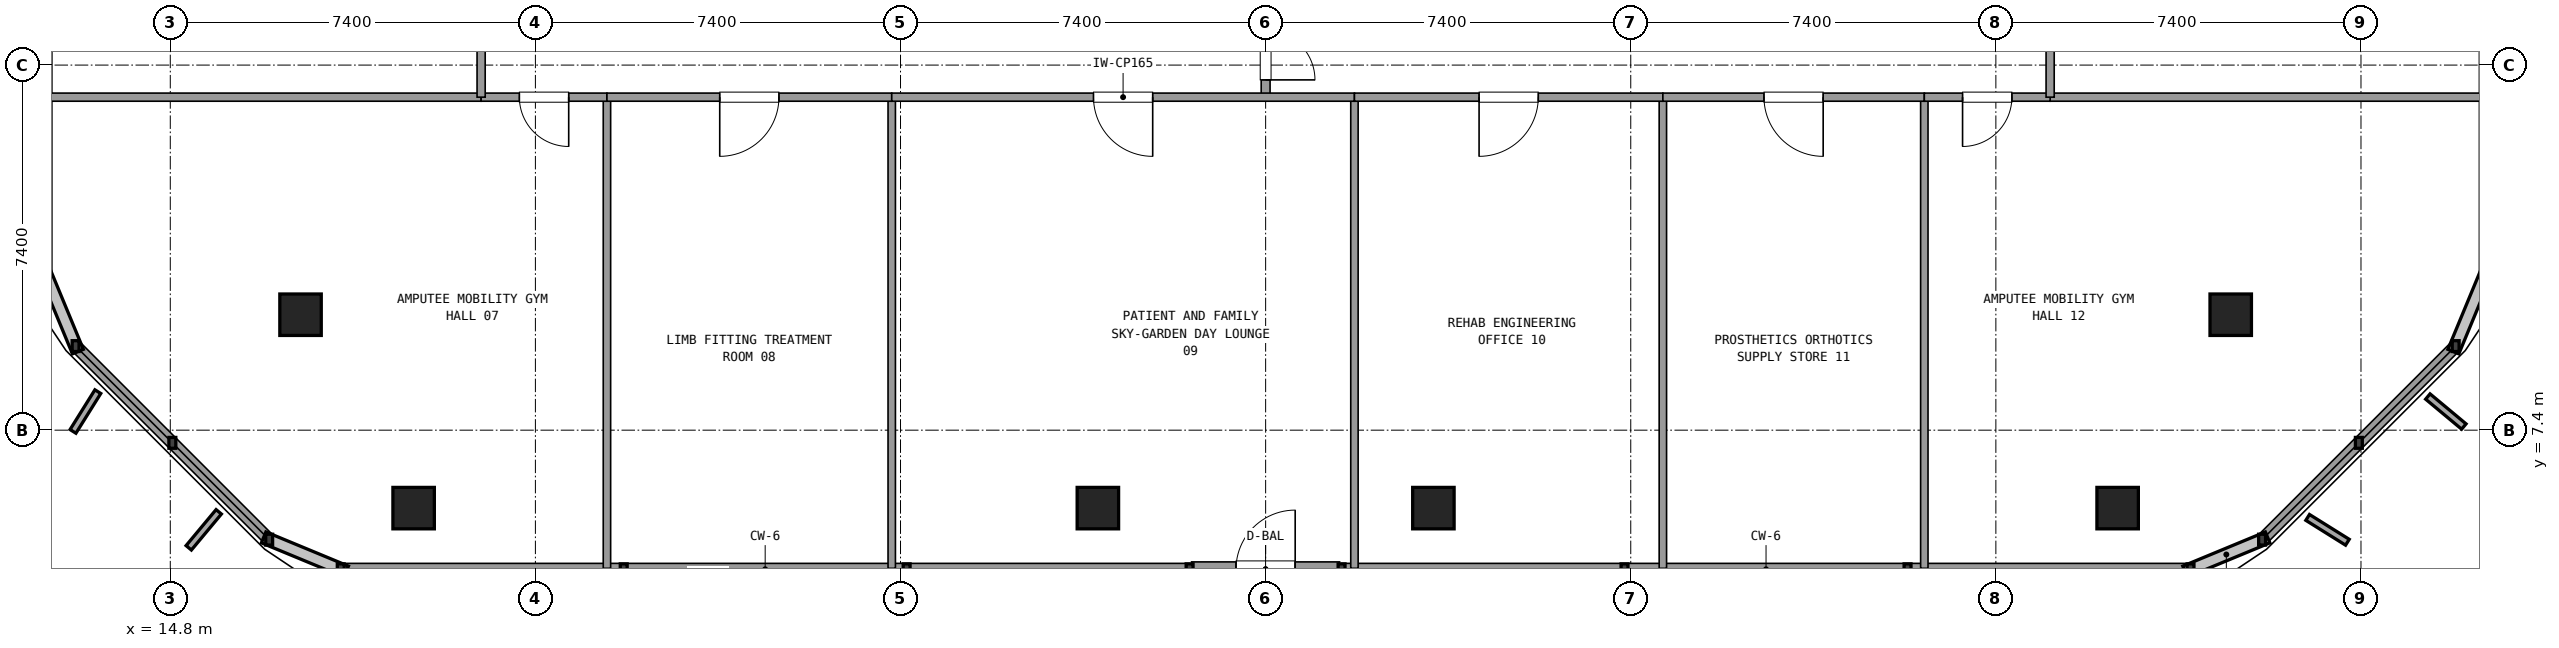
"""IFC4 building model, lengths in metres.
Left out: names, types, materials, properties, quantities, classifications, styles, units other than length and angle.
Written with IfcOpenShell. Run it as: python <this file> out.ifc"""

import sys

from ifc_helpers import new_model, si_unit, direction, frame, frame_2d, origin, origin_2d, place, context, subcontext, project, spatial, rectangle, extrude, element, fill, save


model = new_model("IFC4")
c1 = context("Model", 3, precision=1e-05, world=origin(), true_north=direction((0.0, 1.0)))
c2 = subcontext(c1, "Body", "Model", "MODEL_VIEW")
j1 = project(units=[si_unit("LENGTHUNIT", "METRE"), si_unit("PLANEANGLEUNIT", "RADIAN")], contexts=[c1])
p1 = place(None, origin())
s1 = spatial("IfcSite", under=j1, at=p1, CompositionType="ELEMENT")
p2 = place(p1, origin())
s2 = spatial("IfcBuilding", under=s1, at=p2, CompositionType="ELEMENT")
p3 = place(p2, frame((0.0, 0.0, 282.42)))
s3 = spatial("IfcBuildingStorey", under=s2, at=p3, CompositionType="ELEMENT", Elevation=282.42)
for number, where, z_axis, x_axis in (
    (1, (17.44, 9.74, 0.0), (0.0, 0.0, 1.0), (1.0, 0.0, 0.0)),
    (2, (19.732, 5.82, 0.0), (0.0, 0.0, 1.0), (1.0, 0.0, 0.0)),
    (3, (33.6, 5.82, 0.0), (0.0, 0.0, 1.0), (1.0, 0.0, 0.0)),
    (4, (40.4, 5.82, 0.0), (0.0, 0.0, 1.0), (1.0, 0.0, 0.0)),
    (5, (54.268, 5.82, 0.0), (0.0, 0.0, 1.0), (1.0, 0.0, 0.0)),
    (6, (56.56, 9.74, 0.0), (0.0, 0.0, 1.0), (1.0, 0.0, 0.0)),
):
    element("IfcColumn", number, at=place(p3, frame(where, z_axis=z_axis, x_axis=x_axis)), inside=s3, PredefinedType="COLUMN", context=c2, shape_type="SweptSolid", body=[
        extrude(rectangle(XDim=0.84, YDim=0.84, at=origin_2d()), origin(), (0.0, 0.0, 1.0), 3.6),
    ])
p4 = place(p3, frame((35.499, 4.58, 0.0), z_axis=(0.0, 0.0, 1.0), x_axis=(1.0, 0.0, 0.0)))
e7 = element("IfcWall", 7, at=p4, inside=s3, PredefinedType="SOLIDWALL", context=c2, shape_type="SweptSolid", body=[
    extrude(rectangle(XDim=3.0, YDim=0.3, at=frame_2d((1.5, 0.0))), origin(), (0.0, 0.0, 1.0), 2.35),
])
p5 = place(p4, frame((0.9, 0.0, 0.0)))
e8 = element("IfcOpeningElement", 8, at=p5, cuts=e7, PredefinedType="OPENING", context=c2, shape_type="SweptSolid", body=[
    extrude(rectangle(XDim=1.2, YDim=2.2, at=frame_2d((0.6, 1.1))), frame((0.0, 0.16, 0.0), z_axis=(0.0, -1.0, 0.0), x_axis=(1.0, 0.0, 0.0)), (0.0, 0.0, 1.0), 0.32),
])
p6 = place(p3, frame((18.255, 4.58, 0.0), z_axis=(0.0, 0.0, 1.0), x_axis=(1.0, 0.0, 0.0)))
e9 = element("IfcWall", 9, at=p6, inside=s3, PredefinedType="SOLIDWALL", context=c2, shape_type="SweptSolid", body=[
    extrude(rectangle(XDim=17.204, YDim=0.24, at=frame_2d((8.602, 0.0))), origin(), (0.0, 0.0, 1.0), 0.85),
])
p7 = place(p3, frame((38.539, 4.58, 0.0), z_axis=(0.0, 0.0, 1.0), x_axis=(1.0, 0.0, 0.0)))
e10 = element("IfcWall", 10, at=p7, inside=s3, PredefinedType="SOLIDWALL", context=c2, shape_type="SweptSolid", body=[
    extrude(rectangle(XDim=17.206, YDim=0.24, at=frame_2d((8.603, 0.0))), origin(), (0.0, 0.0, 1.0), 0.85),
])
p8 = place(p3, frame((57.196, 5.181, 0.0), z_axis=(0.0, 0.0, 1.0), x_axis=(0.707084777957, 0.707128783731, 0.0)))
e11 = element("IfcWall", 11, at=p8, inside=s3, PredefinedType="SOLIDWALL", context=c2, shape_type="SweptSolid", body=[
    extrude(rectangle(XDim=5.548, YDim=0.24, at=frame_2d((2.774, 0.0))), origin(), (0.0, 0.0, 1.0), 0.85),
])
for number, where, z_axis, x_axis in (
    (12, (61.72, 10.555, 0.0), (0.0, 0.0, 1.0), (0.0, 1.0, 0.0)),
    (13, (12.28, 41.245, 0.0), (0.0, 0.0, 1.0), (0.0, -1.0, 0.0)),
):
    element("IfcWall", number, at=place(p3, frame(where, z_axis=z_axis, x_axis=x_axis)), inside=s3, PredefinedType="SOLIDWALL", context=c2, shape_type="SweptSolid", body=[
        extrude(rectangle(XDim=30.69, YDim=0.24, at=frame_2d((15.345, 0.0))), origin(), (0.0, 0.0, 1.0), 0.85),
    ])
p9 = place(p3, frame((12.881, 9.104, 0.0), z_axis=(0.0, 0.0, 1.0), x_axis=(0.707084777957, -0.707128783731, 0.0)))
e14 = element("IfcWall", 14, at=p9, inside=s3, PredefinedType="SOLIDWALL", context=c2, shape_type="SweptSolid", body=[
    extrude(rectangle(XDim=5.548, YDim=0.24, at=frame_2d((2.774, 0.0))), origin(), (0.0, 0.0, 1.0), 0.85),
])
p10 = place(p3, frame((37.0, 14.15, 0.0), z_axis=(0.0, 0.0, 1.0), x_axis=(0.0, 1.0, 0.0)))
e15 = element("IfcWall", 15, at=p10, inside=s3, PredefinedType="PARTITIONING", context=c2, shape_type="SweptSolid", body=[
    extrude(rectangle(XDim=2.7, YDim=0.18, at=frame_2d((1.35, 0.0))), origin(), (0.0, 0.0, 1.0), 2.24),
])
p11 = place(p10, frame((0.35, 0.0, 0.0)))
e16 = element("IfcOpeningElement", 16, at=p11, cuts=e15, PredefinedType="OPENING", context=c2, shape_type="SweptSolid", body=[
    extrude(rectangle(XDim=2.0, YDim=2.2, at=frame_2d((1.0, 1.1))), frame((0.0, 0.1, 0.0), z_axis=(0.0, -1.0, 0.0), x_axis=(1.0, 0.0, 0.0)), (0.0, 0.0, 1.0), 0.2),
])
for number, where, z_axis, x_axis in (
    (17, (12.3, 14.15, 0.0), (0.0, 0.0, 1.0), (1.0, 0.0, 0.0)),
    (18, (52.9, 14.15, 0.0), (0.0, 0.0, 1.0), (1.0, 0.0, 0.0)),
):
    element("IfcWall", number, at=place(p3, frame(where, z_axis=z_axis, x_axis=x_axis)), inside=s3, PredefinedType="PARTITIONING", context=c2, shape_type="SweptSolid", body=[
        extrude(rectangle(XDim=8.8, YDim=0.165, at=frame_2d((4.4, 0.0))), origin(), (0.0, 0.0, 1.0), 2.24),
    ])
p12 = place(p3, frame((23.65, 14.15, 0.0), z_axis=(0.0, 0.0, 1.0), x_axis=(0.0, -1.0, 0.0)))
e19 = element("IfcWall", 19, at=p12, inside=s3, PredefinedType="PARTITIONING", context=c2, shape_type="SweptSolid", body=[
    extrude(rectangle(XDim=9.55, YDim=0.15, at=frame_2d((4.775, 0.0))), origin(), (0.0, 0.0, 1.0), 2.24),
])
p13 = place(p3, frame((21.1, 14.15, 0.0), z_axis=(0.0, 0.0, 1.0), x_axis=(1.0, 0.0, 0.0)))
e20 = element("IfcWall", 20, at=p13, inside=s3, PredefinedType="PARTITIONING", context=c2, shape_type="SweptSolid", body=[
    extrude(rectangle(XDim=2.55, YDim=0.165, at=frame_2d((1.275, 0.0))), origin(), (0.0, 0.0, 1.0), 2.24),
])
p14 = place(p13, frame((0.775, 0.0, 0.0)))
e21 = element("IfcOpeningElement", 21, at=p14, cuts=e20, PredefinedType="OPENING", context=c2, shape_type="SweptSolid", body=[
    extrude(rectangle(XDim=1.0, YDim=2.15, at=frame_2d((0.5, 1.075))), frame((0.0, 0.093, 0.0), z_axis=(0.0, -1.0, 0.0), x_axis=(1.0, 0.0, 0.0)), (0.0, 0.0, 1.0), 0.185),
])
p15 = place(p3, frame((29.422, 14.15, 0.0), z_axis=(0.0, 0.0, 1.0), x_axis=(0.0, -1.0, 0.0)))
e22 = element("IfcWall", 22, at=p15, inside=s3, PredefinedType="PARTITIONING", context=c2, shape_type="SweptSolid", body=[
    extrude(rectangle(XDim=9.55, YDim=0.15, at=frame_2d((4.775, 0.0))), origin(), (0.0, 0.0, 1.0), 2.24),
])
p16 = place(p3, frame((23.65, 14.15, 0.0), z_axis=(0.0, 0.0, 1.0), x_axis=(1.0, 0.0, 0.0)))
e23 = element("IfcWall", 23, at=p16, inside=s3, PredefinedType="PARTITIONING", context=c2, shape_type="SweptSolid", body=[
    extrude(rectangle(XDim=5.772, YDim=0.165, at=frame_2d((2.886, 0.0))), origin(), (0.0, 0.0, 1.0), 2.24),
])
p17 = place(p16, frame((2.286, 0.0, 0.0)))
e24 = element("IfcOpeningElement", 24, at=p17, cuts=e23, PredefinedType="OPENING", context=c2, shape_type="SweptSolid", body=[
    extrude(rectangle(XDim=1.2, YDim=2.15, at=frame_2d((0.6, 1.075))), frame((0.0, 0.093, 0.0), z_axis=(0.0, -1.0, 0.0), x_axis=(1.0, 0.0, 0.0)), (0.0, 0.0, 1.0), 0.185),
])
p18 = place(p3, frame((38.8, 14.15, 0.0), z_axis=(0.0, 0.0, 1.0), x_axis=(0.0, -1.0, 0.0)))
e25 = element("IfcWall", 25, at=p18, inside=s3, PredefinedType="PARTITIONING", context=c2, shape_type="SweptSolid", body=[
    extrude(rectangle(XDim=9.55, YDim=0.15, at=frame_2d((4.775, 0.0))), origin(), (0.0, 0.0, 1.0), 2.24),
])
p19 = place(p3, frame((29.422, 14.15, 0.0), z_axis=(0.0, 0.0, 1.0), x_axis=(1.0, 0.0, 0.0)))
e26 = element("IfcWall", 26, at=p19, inside=s3, PredefinedType="PARTITIONING", context=c2, shape_type="SweptSolid", body=[
    extrude(rectangle(XDim=9.378, YDim=0.165, at=frame_2d((4.689, 0.0))), origin(), (0.0, 0.0, 1.0), 2.24),
])
p20 = place(p19, frame((4.089, 0.0, 0.0)))
e27 = element("IfcOpeningElement", 27, at=p20, cuts=e26, PredefinedType="OPENING", context=c2, shape_type="SweptSolid", body=[
    extrude(rectangle(XDim=1.2, YDim=2.15, at=frame_2d((0.6, 1.075))), frame((0.0, 0.093, 0.0), z_axis=(0.0, -1.0, 0.0), x_axis=(1.0, 0.0, 0.0)), (0.0, 0.0, 1.0), 0.185),
])
p21 = place(p3, frame((45.051, 14.15, 0.0), z_axis=(0.0, 0.0, 1.0), x_axis=(0.0, -1.0, 0.0)))
e28 = element("IfcWall", 28, at=p21, inside=s3, PredefinedType="PARTITIONING", context=c2, shape_type="SweptSolid", body=[
    extrude(rectangle(XDim=9.55, YDim=0.15, at=frame_2d((4.775, 0.0))), origin(), (0.0, 0.0, 1.0), 2.24),
])
p22 = place(p3, frame((38.8, 14.15, 0.0), z_axis=(0.0, 0.0, 1.0), x_axis=(1.0, 0.0, 0.0)))
e29 = element("IfcWall", 29, at=p22, inside=s3, PredefinedType="PARTITIONING", context=c2, shape_type="SweptSolid", body=[
    extrude(rectangle(XDim=6.251, YDim=0.165, at=frame_2d((3.125, 0.0))), origin(), (0.0, 0.0, 1.0), 2.24),
])
p23 = place(p22, frame((2.526, 0.0, 0.0)))
e30 = element("IfcOpeningElement", 30, at=p23, cuts=e29, PredefinedType="OPENING", context=c2, shape_type="SweptSolid", body=[
    extrude(rectangle(XDim=1.2, YDim=2.15, at=frame_2d((0.6, 1.075))), frame((0.0, 0.093, 0.0), z_axis=(0.0, -1.0, 0.0), x_axis=(1.0, 0.0, 0.0)), (0.0, 0.0, 1.0), 0.185),
])
p24 = place(p3, frame((50.35, 14.15, 0.0), z_axis=(0.0, 0.0, 1.0), x_axis=(0.0, -1.0, 0.0)))
e31 = element("IfcWall", 31, at=p24, inside=s3, PredefinedType="PARTITIONING", context=c2, shape_type="SweptSolid", body=[
    extrude(rectangle(XDim=9.55, YDim=0.15, at=frame_2d((4.775, 0.0))), origin(), (0.0, 0.0, 1.0), 2.24),
])
p25 = place(p3, frame((45.051, 14.15, 0.0), z_axis=(0.0, 0.0, 1.0), x_axis=(1.0, 0.0, 0.0)))
e32 = element("IfcWall", 32, at=p25, inside=s3, PredefinedType="PARTITIONING", context=c2, shape_type="SweptSolid", body=[
    extrude(rectangle(XDim=5.299, YDim=0.165, at=frame_2d((2.649, 0.0))), origin(), (0.0, 0.0, 1.0), 2.24),
])
p26 = place(p25, frame((2.049, 0.0, 0.0)))
e33 = element("IfcOpeningElement", 33, at=p26, cuts=e32, PredefinedType="OPENING", context=c2, shape_type="SweptSolid", body=[
    extrude(rectangle(XDim=1.2, YDim=2.15, at=frame_2d((0.6, 1.075))), frame((0.0, 0.093, 0.0), z_axis=(0.0, -1.0, 0.0), x_axis=(1.0, 0.0, 0.0)), (0.0, 0.0, 1.0), 0.185),
])
p27 = place(p3, frame((50.35, 14.15, 0.0), z_axis=(0.0, 0.0, 1.0), x_axis=(1.0, 0.0, 0.0)))
e34 = element("IfcWall", 34, at=p27, inside=s3, PredefinedType="PARTITIONING", context=c2, shape_type="SweptSolid", body=[
    extrude(rectangle(XDim=2.55, YDim=0.165, at=frame_2d((1.275, 0.0))), origin(), (0.0, 0.0, 1.0), 2.24),
])
p28 = place(p27, frame((0.775, 0.0, 0.0)))
e35 = element("IfcOpeningElement", 35, at=p28, cuts=e34, PredefinedType="OPENING", context=c2, shape_type="SweptSolid", body=[
    extrude(rectangle(XDim=1.0, YDim=2.15, at=frame_2d((0.5, 1.075))), frame((0.0, 0.093, 0.0), z_axis=(0.0, -1.0, 0.0), x_axis=(1.0, 0.0, 0.0)), (0.0, 0.0, 1.0), 0.185),
])
p29 = place(p3, frame((21.1, 14.15, 0.0), z_axis=(0.0, 0.0, 1.0), x_axis=(0.0, 1.0, 0.0)))
e36 = element("IfcWall", 36, at=p29, inside=s3, PredefinedType="PARTITIONING", context=c2, shape_type="SweptSolid", body=[
    extrude(rectangle(XDim=7.05, YDim=0.165, at=frame_2d((3.525, 0.0))), origin(), (0.0, 0.0, 1.0), 2.24),
])
p30 = place(p29, frame((2.925, 0.0, 0.0)))
e37 = element("IfcOpeningElement", 37, at=p30, cuts=e36, PredefinedType="OPENING", context=c2, shape_type="SweptSolid", body=[
    extrude(rectangle(XDim=1.2, YDim=2.15, at=frame_2d((0.6, 1.075))), frame((0.0, 0.093, 0.0), z_axis=(0.0, -1.0, 0.0), x_axis=(1.0, 0.0, 0.0)), (0.0, 0.0, 1.0), 0.185),
])
p31 = place(p3, frame((52.9, 14.15, 0.0), z_axis=(0.0, 0.0, 1.0), x_axis=(0.0, 1.0, 0.0)))
e38 = element("IfcWall", 38, at=p31, inside=s3, PredefinedType="PARTITIONING", context=c2, shape_type="SweptSolid", body=[
    extrude(rectangle(XDim=6.58, YDim=0.165, at=frame_2d((3.29, 0.0))), origin(), (0.0, 0.0, 1.0), 2.24),
])
p32 = place(p31, frame((2.69, 0.0, 0.0)))
e39 = element("IfcOpeningElement", 39, at=p32, cuts=e38, PredefinedType="OPENING", context=c2, shape_type="SweptSolid", body=[
    extrude(rectangle(XDim=1.2, YDim=2.15, at=frame_2d((0.6, 1.075))), frame((0.0, 0.093, 0.0), z_axis=(0.0, -1.0, 0.0), x_axis=(1.0, 0.0, 0.0)), (0.0, 0.0, 1.0), 0.185),
])
p33 = place(p11, frame((2.0, 0.0, 0.0), z_axis=(0.0, 0.0, 1.0), x_axis=(-1.0, 0.0, 0.0)))
e40 = element("IfcDoor", 40, at=p33, inside=s3, OperationType="DOUBLE_DOOR_SINGLE_SWING", PredefinedType="DOOR", context=c2, shape_type="SweptSolid", body=[
    extrude(rectangle(XDim=2.0, YDim=2.2, at=frame_2d((1.0, 1.1))), frame((0.0, 0.025, 0.0), z_axis=(0.0, -1.0, 0.0), x_axis=(1.0, 0.0, 0.0)), (0.0, 0.0, 1.0), 0.05),
])
fill(e16, e40)
p34 = place(p14, frame((1.0, 0.0, 0.0), z_axis=(0.0, 0.0, 1.0), x_axis=(-1.0, 0.0, 0.0)))
e41 = element("IfcDoor", 41, at=p34, inside=s3, OperationType="SINGLE_SWING_RIGHT", PredefinedType="DOOR", context=c2, shape_type="SweptSolid", body=[
    extrude(rectangle(XDim=1.0, YDim=2.15, at=frame_2d((0.5, 1.075))), frame((0.0, 0.025, 0.0), z_axis=(0.0, -1.0, 0.0), x_axis=(1.0, 0.0, 0.0)), (0.0, 0.0, 1.0), 0.05),
])
fill(e21, e41)
p35 = place(p17, frame((1.2, 0.0, 0.0), z_axis=(0.0, 0.0, 1.0), x_axis=(-1.0, 0.0, 0.0)))
e42 = element("IfcDoor", 42, at=p35, inside=s3, OperationType="SINGLE_SWING_LEFT", PredefinedType="DOOR", context=c2, shape_type="SweptSolid", body=[
    extrude(rectangle(XDim=1.2, YDim=2.15, at=frame_2d((0.6, 1.075))), frame((0.0, 0.025, 0.0), z_axis=(0.0, -1.0, 0.0), x_axis=(1.0, 0.0, 0.0)), (0.0, 0.0, 1.0), 0.05),
])
fill(e24, e42)
p36 = place(p20, frame((1.2, 0.0, 0.0), z_axis=(0.0, 0.0, 1.0), x_axis=(-1.0, 0.0, 0.0)))
e43 = element("IfcDoor", 43, at=p36, inside=s3, OperationType="SINGLE_SWING_RIGHT", PredefinedType="DOOR", context=c2, shape_type="SweptSolid", body=[
    extrude(rectangle(XDim=1.2, YDim=2.15, at=frame_2d((0.6, 1.075))), frame((0.0, 0.025, 0.0), z_axis=(0.0, -1.0, 0.0), x_axis=(1.0, 0.0, 0.0)), (0.0, 0.0, 1.0), 0.05),
])
fill(e27, e43)
p37 = place(p23, frame((1.2, 0.0, 0.0), z_axis=(0.0, 0.0, 1.0), x_axis=(-1.0, 0.0, 0.0)))
e44 = element("IfcDoor", 44, at=p37, inside=s3, OperationType="SINGLE_SWING_LEFT", PredefinedType="DOOR", context=c2, shape_type="SweptSolid", body=[
    extrude(rectangle(XDim=1.2, YDim=2.15, at=frame_2d((0.6, 1.075))), frame((0.0, 0.025, 0.0), z_axis=(0.0, -1.0, 0.0), x_axis=(1.0, 0.0, 0.0)), (0.0, 0.0, 1.0), 0.05),
])
fill(e30, e44)
p38 = place(p26, frame((1.2, 0.0, 0.0), z_axis=(0.0, 0.0, 1.0), x_axis=(-1.0, 0.0, 0.0)))
e45 = element("IfcDoor", 45, at=p38, inside=s3, OperationType="SINGLE_SWING_RIGHT", PredefinedType="DOOR", context=c2, shape_type="SweptSolid", body=[
    extrude(rectangle(XDim=1.2, YDim=2.15, at=frame_2d((0.6, 1.075))), frame((0.0, 0.025, 0.0), z_axis=(0.0, -1.0, 0.0), x_axis=(1.0, 0.0, 0.0)), (0.0, 0.0, 1.0), 0.05),
])
fill(e33, e45)
p39 = place(p28, frame((1.0, 0.0, 0.0), z_axis=(0.0, 0.0, 1.0), x_axis=(-1.0, 0.0, 0.0)))
e46 = element("IfcDoor", 46, at=p39, inside=s3, OperationType="SINGLE_SWING_LEFT", PredefinedType="DOOR", context=c2, shape_type="SweptSolid", body=[
    extrude(rectangle(XDim=1.0, YDim=2.15, at=frame_2d((0.5, 1.075))), frame((0.0, 0.025, 0.0), z_axis=(0.0, -1.0, 0.0), x_axis=(1.0, 0.0, 0.0)), (0.0, 0.0, 1.0), 0.05),
])
fill(e35, e46)
save(model, sys.argv[1])
